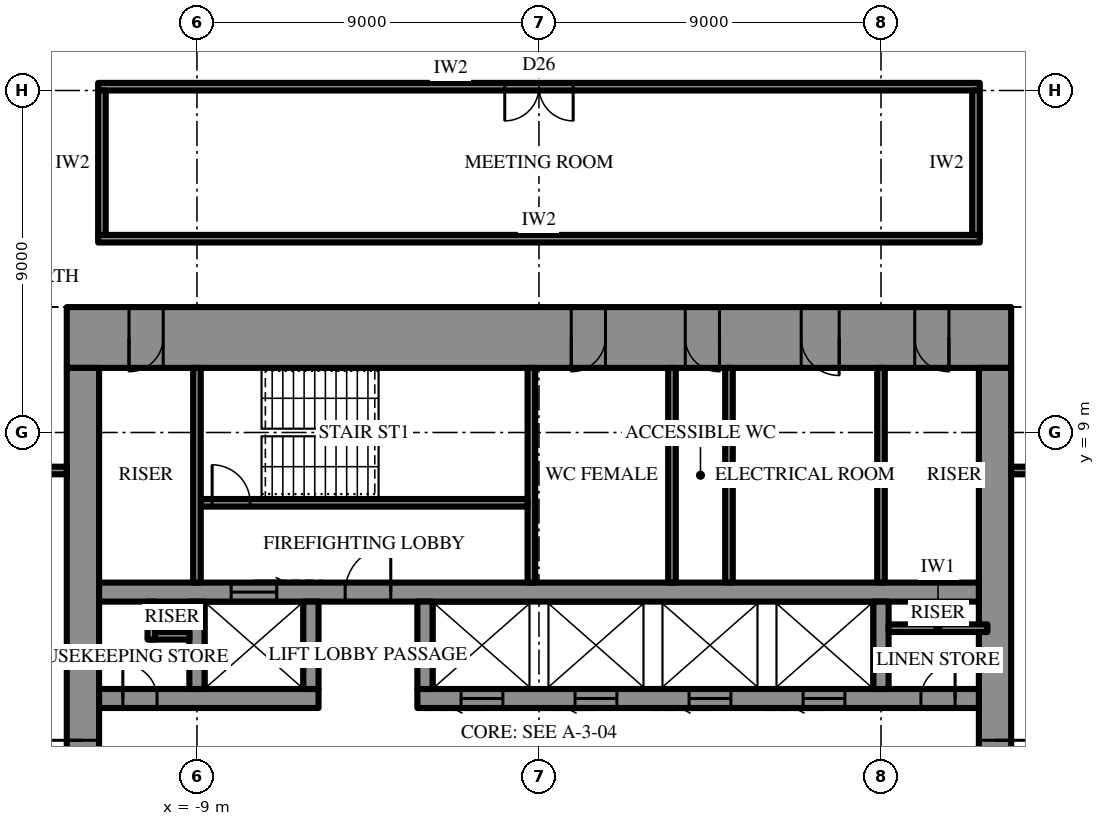
"""IFC4 building model, lengths in metres.
Left out: names, types, materials, properties, quantities, classifications, styles, units other than length and angle.
Written with IfcOpenShell. Run it as: python <this file> out.ifc"""

import sys

from ifc_helpers import new_model, si_unit, direction, frame, frame_2d, origin, place, context, subcontext, project, spatial, rectangle, extrude, element, fill, save


model = new_model("IFC4")
c1 = context("Model", 3, precision=1e-05, world=origin(), true_north=direction((0.0, 1.0)))
c2 = subcontext(c1, "Body", "Model", "MODEL_VIEW")
j1 = project(units=[si_unit("LENGTHUNIT", "METRE"), si_unit("PLANEANGLEUNIT", "RADIAN")], contexts=[c1])
p1 = place(None, origin())
s1 = spatial("IfcSite", under=j1, at=p1, CompositionType="ELEMENT")
p2 = place(p1, origin())
s2 = spatial("IfcBuilding", under=s1, at=p2, CompositionType="ELEMENT")
p3 = place(p2, frame((0.0, 0.0, 311.5)))
s3 = spatial("IfcBuildingStorey", under=s2, at=p3, CompositionType="ELEMENT", Elevation=311.5)
p4 = place(p3, frame((-12.425, 11.5, 0.0), z_axis=(0.0, 0.0, 1.0), x_axis=(1.0, 0.0, 0.0)))
e1 = element("IfcWall", 1, at=p4, inside=s3, PredefinedType="SHEAR", context=c2, shape_type="SweptSolid", body=[
    extrude(rectangle(XDim=24.85, YDim=1.6, at=frame_2d((12.425, 0.0))), origin(), (0.0, 0.0, 1.0), 4.2),
])
p5 = place(p4, frame((13.275, 0.0, 0.0)))
e2 = element("IfcOpeningElement", 2, at=p5, cuts=e1, PredefinedType="OPENING", context=c2, shape_type="SweptSolid", body=[
    extrude(rectangle(XDim=0.9, YDim=2.2, at=frame_2d((0.45, 1.1))), frame((0.0, 0.81, 0.0), z_axis=(0.0, -1.0, 0.0), x_axis=(1.0, 0.0, 0.0)), (0.0, 0.0, 1.0), 1.62),
])
p6 = place(p4, frame((16.275, 0.0, 0.0)))
e3 = element("IfcOpeningElement", 3, at=p6, cuts=e1, PredefinedType="OPENING", context=c2, shape_type="SweptSolid", body=[
    extrude(rectangle(XDim=0.9, YDim=2.2, at=frame_2d((0.45, 1.1))), frame((0.0, 0.81, 0.0), z_axis=(0.0, -1.0, 0.0), x_axis=(1.0, 0.0, 0.0)), (0.0, 0.0, 1.0), 1.62),
])
p7 = place(p4, frame((19.325, 0.0, 0.0)))
e4 = element("IfcOpeningElement", 4, at=p7, cuts=e1, PredefinedType="OPENING", context=c2, shape_type="SweptSolid", body=[
    extrude(rectangle(XDim=1.0, YDim=2.2, at=frame_2d((0.5, 1.1))), frame((0.0, 0.81, 0.0), z_axis=(0.0, -1.0, 0.0), x_axis=(1.0, 0.0, 0.0)), (0.0, 0.0, 1.0), 1.62),
])
p8 = place(p4, frame((1.637, 0.0, 0.0)))
e5 = element("IfcOpeningElement", 5, at=p8, cuts=e1, PredefinedType="OPENING", context=c2, shape_type="SweptSolid", body=[
    extrude(rectangle(XDim=0.9, YDim=2.2, at=frame_2d((0.45, 1.1))), frame((0.0, 0.81, 0.0), z_axis=(0.0, -1.0, 0.0), x_axis=(1.0, 0.0, 0.0)), (0.0, 0.0, 1.0), 1.62),
])
p9 = place(p4, frame((22.312, 0.0, 0.0)))
e6 = element("IfcOpeningElement", 6, at=p9, cuts=e1, PredefinedType="OPENING", context=c2, shape_type="SweptSolid", body=[
    extrude(rectangle(XDim=0.9, YDim=2.2, at=frame_2d((0.45, 1.1))), frame((0.0, 0.81, 0.0), z_axis=(0.0, -1.0, 0.0), x_axis=(1.0, 0.0, 0.0)), (0.0, 0.0, 1.0), 1.62),
])
p10 = place(p3, frame((12.0, -10.7, 0.0), z_axis=(0.0, 0.0, 1.0), x_axis=(0.0, 1.0, 0.0)))
e7 = element("IfcWall", 7, at=p10, inside=s3, PredefinedType="SHEAR", context=c2, shape_type="SweptSolid", body=[
    extrude(rectangle(XDim=21.4, YDim=0.85, at=frame_2d((10.7, 0.0))), origin(), (0.0, 0.0, 1.0), 4.2),
])
p11 = place(p10, frame((9.8, 0.0, 0.0)))
e8 = element("IfcOpeningElement", 8, at=p11, cuts=e7, PredefinedType="OPENING", context=c2, shape_type="SweptSolid", body=[
    extrude(rectangle(XDim=1.8, YDim=2.4, at=frame_2d((0.9, 1.2))), frame((0.0, 0.435, 0.0), z_axis=(0.0, -1.0, 0.0), x_axis=(1.0, 0.0, 0.0)), (0.0, 0.0, 1.0), 0.87),
])
p12 = place(p3, frame((-12.0, 10.7, 0.0), z_axis=(0.0, 0.0, 1.0), x_axis=(0.0, -1.0, 0.0)))
e9 = element("IfcWall", 9, at=p12, inside=s3, PredefinedType="SHEAR", context=c2, shape_type="SweptSolid", body=[
    extrude(rectangle(XDim=21.4, YDim=0.85, at=frame_2d((10.7, 0.0))), origin(), (0.0, 0.0, 1.0), 4.2),
])
p13 = place(p12, frame((9.8, 0.0, 0.0)))
e10 = element("IfcOpeningElement", 10, at=p13, cuts=e9, PredefinedType="OPENING", context=c2, shape_type="SweptSolid", body=[
    extrude(rectangle(XDim=1.8, YDim=2.4, at=frame_2d((0.9, 1.2))), frame((0.0, 0.435, 0.0), z_axis=(0.0, -1.0, 0.0), x_axis=(1.0, 0.0, 0.0)), (0.0, 0.0, 1.0), 0.87),
])
p14 = place(p3, frame((-11.575, 2.0, 0.0), z_axis=(0.0, 0.0, 1.0), x_axis=(1.0, 0.0, 0.0)))
e11 = element("IfcWall", 11, at=p14, inside=s3, PredefinedType="SHEAR", context=c2, shape_type="SweptSolid", body=[
    extrude(rectangle(XDim=5.775, YDim=0.5, at=frame_2d((2.887, 0.0))), origin(), (0.0, 0.0, 1.0), 4.2),
])
p15 = place(p14, frame((0.625, 0.0, 0.0)))
e12 = element("IfcOpeningElement", 12, at=p15, cuts=e11, PredefinedType="OPENING", context=c2, shape_type="SweptSolid", body=[
    extrude(rectangle(XDim=0.9, YDim=2.2, at=frame_2d((0.45, 1.1))), frame((0.0, 0.26, 0.0), z_axis=(0.0, -1.0, 0.0), x_axis=(1.0, 0.0, 0.0)), (0.0, 0.0, 1.0), 0.52),
])
p16 = place(p3, frame((-3.2, 2.0, 0.0), z_axis=(0.0, 0.0, 1.0), x_axis=(1.0, 0.0, 0.0)))
e13 = element("IfcWall", 13, at=p16, inside=s3, PredefinedType="SHEAR", context=c2, shape_type="SweptSolid", body=[
    extrude(rectangle(XDim=14.775, YDim=0.5, at=frame_2d((7.387, 0.0))), origin(), (0.0, 0.0, 1.0), 4.2),
])
p17 = place(p16, frame((13.25, 0.0, 0.0)))
e14 = element("IfcOpeningElement", 14, at=p17, cuts=e13, PredefinedType="OPENING", context=c2, shape_type="SweptSolid", body=[
    extrude(rectangle(XDim=0.9, YDim=2.2, at=frame_2d((0.45, 1.1))), frame((0.0, 0.26, 0.0), z_axis=(0.0, -1.0, 0.0), x_axis=(1.0, 0.0, 0.0)), (0.0, 0.0, 1.0), 0.52),
])
p18 = place(p16, frame((1.15, 0.0, 0.0)))
e15 = element("IfcOpeningElement", 15, at=p18, cuts=e13, PredefinedType="OPENING", context=c2, shape_type="SweptSolid", body=[
    extrude(rectangle(XDim=1.1, YDim=2.2, at=frame_2d((0.55, 1.1))), frame((0.0, 0.26, 0.0), z_axis=(0.0, -1.0, 0.0), x_axis=(1.0, 0.0, 0.0)), (0.0, 0.0, 1.0), 0.52),
])
p19 = place(p16, frame((4.15, 0.0, 0.0)))
e16 = element("IfcOpeningElement", 16, at=p19, cuts=e13, PredefinedType="OPENING", context=c2, shape_type="SweptSolid", body=[
    extrude(rectangle(XDim=1.1, YDim=2.2, at=frame_2d((0.55, 1.1))), frame((0.0, 0.26, 0.0), z_axis=(0.0, -1.0, 0.0), x_axis=(1.0, 0.0, 0.0)), (0.0, 0.0, 1.0), 0.52),
])
p20 = place(p16, frame((7.15, 0.0, 0.0)))
e17 = element("IfcOpeningElement", 17, at=p20, cuts=e13, PredefinedType="OPENING", context=c2, shape_type="SweptSolid", body=[
    extrude(rectangle(XDim=1.1, YDim=2.2, at=frame_2d((0.55, 1.1))), frame((0.0, 0.26, 0.0), z_axis=(0.0, -1.0, 0.0), x_axis=(1.0, 0.0, 0.0)), (0.0, 0.0, 1.0), 0.52),
])
p21 = place(p16, frame((10.15, 0.0, 0.0)))
e18 = element("IfcOpeningElement", 18, at=p21, cuts=e13, PredefinedType="OPENING", context=c2, shape_type="SweptSolid", body=[
    extrude(rectangle(XDim=1.1, YDim=2.2, at=frame_2d((0.55, 1.1))), frame((0.0, 0.26, 0.0), z_axis=(0.0, -1.0, 0.0), x_axis=(1.0, 0.0, 0.0)), (0.0, 0.0, 1.0), 0.52),
])
p22 = place(p3, frame((-11.575, 4.8, 0.0), z_axis=(0.0, 0.0, 1.0), x_axis=(1.0, 0.0, 0.0)))
e19 = element("IfcWall", 19, at=p22, inside=s3, PredefinedType="SHEAR", context=c2, shape_type="SweptSolid", body=[
    extrude(rectangle(XDim=23.15, YDim=0.5, at=frame_2d((11.575, 0.0))), origin(), (0.0, 0.0, 1.0), 4.2),
])
p23 = place(p22, frame((6.475, 0.0, 0.0)))
e20 = element("IfcOpeningElement", 20, at=p23, cuts=e19, PredefinedType="OPENING", context=c2, shape_type="SweptSolid", body=[
    extrude(rectangle(XDim=1.2, YDim=2.2, at=frame_2d((0.6, 1.1))), frame((0.0, 0.26, 0.0), z_axis=(0.0, -1.0, 0.0), x_axis=(1.0, 0.0, 0.0)), (0.0, 0.0, 1.0), 0.52),
])
p24 = place(p22, frame((3.475, 0.0, 0.0)))
e21 = element("IfcOpeningElement", 21, at=p24, cuts=e19, PredefinedType="OPENING", context=c2, shape_type="SweptSolid", body=[
    extrude(rectangle(XDim=1.2, YDim=2.2, at=frame_2d((0.6, 1.1))), frame((0.0, 0.26, 0.0), z_axis=(0.0, -1.0, 0.0), x_axis=(1.0, 0.0, 0.0)), (0.0, 0.0, 1.0), 0.52),
])
for number, where, z_axis, x_axis in (
    (22, (-9.0, 2.25, 0.0), (0.0, 0.0, 1.0), (0.0, 1.0, 0.0)),
    (23, (-6.0, 2.25, 0.0), (0.0, 0.0, 1.0), (0.0, 1.0, 0.0)),
    (24, (-3.0, 2.25, 0.0), (0.0, 0.0, 1.0), (0.0, 1.0, 0.0)),
    (25, (9.0, 2.25, 0.0), (0.0, 0.0, 1.0), (0.0, 1.0, 0.0)),
):
    element("IfcWall", number, at=place(p3, frame(where, z_axis=z_axis, x_axis=x_axis)), inside=s3, PredefinedType="SHEAR", context=c2, shape_type="SweptSolid", body=[
        extrude(rectangle(XDim=2.3, YDim=0.4, at=frame_2d((1.15, 0.0))), origin(), (0.0, 0.0, 1.0), 4.2),
    ])
p25 = place(p3, frame((-0.2, 5.05, 0.0), z_axis=(0.0, 0.0, 1.0), x_axis=(0.0, 1.0, 0.0)))
e26 = element("IfcWall", 26, at=p25, inside=s3, PredefinedType="SHEAR", context=c2, shape_type="SweptSolid", body=[
    extrude(rectangle(XDim=5.65, YDim=0.2, at=frame_2d((2.825, 0.0))), origin(), (0.0, 0.0, 1.0), 4.2),
])
p26 = place(p3, frame((-8.9, 7.15, 0.0), z_axis=(0.0, 0.0, 1.0), x_axis=(1.0, 0.0, 0.0)))
e27 = element("IfcWall", 27, at=p26, inside=s3, PredefinedType="SHEAR", context=c2, shape_type="SweptSolid", body=[
    extrude(rectangle(XDim=8.6, YDim=0.2, at=frame_2d((4.3, 0.0))), origin(), (0.0, 0.0, 1.0), 4.2),
])
p27 = place(p26, frame((0.3, 0.0, 0.0)))
e28 = element("IfcOpeningElement", 28, at=p27, cuts=e27, PredefinedType="OPENING", context=c2, shape_type="SweptSolid", body=[
    extrude(rectangle(XDim=1.0, YDim=2.2, at=frame_2d((0.5, 1.1))), frame((0.0, 0.11, 0.0), z_axis=(0.0, -1.0, 0.0), x_axis=(1.0, 0.0, 0.0)), (0.0, 0.0, 1.0), 0.22),
])
for number, where, z_axis, x_axis in (
    (29, (-9.0, 5.05, 0.0), (0.0, 0.0, 1.0), (0.0, 1.0, 0.0)),
    (30, (9.0, 5.05, 0.0), (0.0, 0.0, 1.0), (0.0, 1.0, 0.0)),
    (31, (3.5, 5.05, 0.0), (0.0, 0.0, 1.0), (0.0, 1.0, 0.0)),
    (32, (5.0, 5.05, 0.0), (0.0, 0.0, 1.0), (0.0, 1.0, 0.0)),
):
    element("IfcWall", number, at=place(p3, frame(where, z_axis=z_axis, x_axis=x_axis)), inside=s3, PredefinedType="PARTITIONING", context=c2, shape_type="SweptSolid", body=[
        extrude(rectangle(XDim=5.65, YDim=0.2, at=frame_2d((2.825, 0.0))), origin(), (0.0, 0.0, 1.0), 4.0),
    ])
for number, where, z_axis, x_axis in (
    (33, (-10.2, 3.65, 0.0), (0.0, 0.0, 1.0), (1.0, 0.0, 0.0)),
    (34, (-10.2, 3.55, 0.0), (0.0, 0.0, 1.0), (0.0, 1.0, 0.0)),
):
    element("IfcWall", number, at=place(p3, frame(where, z_axis=z_axis, x_axis=x_axis)), inside=s3, PredefinedType="PARTITIONING", context=c2, shape_type="SweptSolid", body=[
        extrude(rectangle(XDim=1.0, YDim=0.2, at=frame_2d((0.5, 0.0))), origin(), (0.0, 0.0, 1.0), 4.0),
    ])
p28 = place(p3, frame((9.2, 3.85, 0.0), z_axis=(0.0, 0.0, 1.0), x_axis=(1.0, 0.0, 0.0)))
e35 = element("IfcWall", 35, at=p28, inside=s3, PredefinedType="PARTITIONING", context=c2, shape_type="SweptSolid", body=[
    extrude(rectangle(XDim=2.6, YDim=0.2, at=frame_2d((1.3, 0.0))), origin(), (0.0, 0.0, 1.0), 4.0),
])
p29 = place(p3, frame((-11.6, 14.1, 0.0), z_axis=(0.0, 0.0, 1.0), x_axis=(1.0, 0.0, 0.0)))
e36 = element("IfcWall", 36, at=p29, inside=s3, PredefinedType="PARTITIONING", context=c2, shape_type="SweptSolid", body=[
    extrude(rectangle(XDim=23.2, YDim=0.2, at=frame_2d((11.6, 0.0))), origin(), (0.0, 0.0, 1.0), 4.0),
])
p30 = place(p3, frame((-11.6, 18.1, 0.0), z_axis=(0.0, 0.0, 1.0), x_axis=(1.0, 0.0, 0.0)))
e37 = element("IfcWall", 37, at=p30, inside=s3, PredefinedType="PARTITIONING", context=c2, shape_type="SweptSolid", body=[
    extrude(rectangle(XDim=23.2, YDim=0.2, at=frame_2d((11.6, 0.0))), origin(), (0.0, 0.0, 1.0), 4.0),
])
p31 = place(p30, frame((10.7, 0.0, 0.0)))
e38 = element("IfcOpeningElement", 38, at=p31, cuts=e37, PredefinedType="OPENING", context=c2, shape_type="SweptSolid", body=[
    extrude(rectangle(XDim=1.8, YDim=2.4, at=frame_2d((0.9, 1.2))), frame((0.0, 0.11, 0.0), z_axis=(0.0, -1.0, 0.0), x_axis=(1.0, 0.0, 0.0)), (0.0, 0.0, 1.0), 0.22),
])
for number, where, z_axis, x_axis in (
    (39, (-11.5, 14.2, 0.0), (0.0, 0.0, 1.0), (0.0, 1.0, 0.0)),
    (40, (11.5, 14.2, 0.0), (0.0, 0.0, 1.0), (0.0, 1.0, 0.0)),
):
    element("IfcWall", number, at=place(p3, frame(where, z_axis=z_axis, x_axis=x_axis)), inside=s3, PredefinedType="PARTITIONING", context=c2, shape_type="SweptSolid", body=[
        extrude(rectangle(XDim=3.8, YDim=0.2, at=frame_2d((1.9, 0.0))), origin(), (0.0, 0.0, 1.0), 4.0),
    ])
p32 = place(p3, frame((12.425, 8.0, 0.0), z_axis=(0.0, 0.0, 1.0), x_axis=(1.0, 0.0, 0.0)))
e41 = element("IfcWall", 41, at=p32, inside=s3, PredefinedType="PARTITIONING", context=c2, shape_type="SweptSolid", body=[
    extrude(rectangle(XDim=13.59, YDim=0.2, at=frame_2d((6.795, 0.0))), origin(), (0.0, 0.0, 1.0), 4.0),
])
p33 = place(p32, frame((0.859, 0.0, 0.0)))
e42 = element("IfcOpeningElement", 42, at=p33, cuts=e41, PredefinedType="OPENING", context=c2, shape_type="SweptSolid", body=[
    extrude(rectangle(XDim=1.0, YDim=2.2, at=frame_2d((0.5, 1.1))), frame((0.0, 0.11, 0.0), z_axis=(0.0, -1.0, 0.0), x_axis=(1.0, 0.0, 0.0)), (0.0, 0.0, 1.0), 0.22),
])
p34 = place(p3, frame((-12.425, 8.0, 0.0), z_axis=(0.0, 0.0, 1.0), x_axis=(-1.0, 0.0, 0.0)))
e43 = element("IfcWall", 43, at=p34, inside=s3, PredefinedType="PARTITIONING", context=c2, shape_type="SweptSolid", body=[
    extrude(rectangle(XDim=13.59, YDim=0.2, at=frame_2d((6.795, 0.0))), origin(), (0.0, 0.0, 1.0), 4.0),
])
p35 = place(p34, frame((0.859, 0.0, 0.0)))
e44 = element("IfcOpeningElement", 44, at=p35, cuts=e43, PredefinedType="OPENING", context=c2, shape_type="SweptSolid", body=[
    extrude(rectangle(XDim=1.0, YDim=2.2, at=frame_2d((0.5, 1.1))), frame((0.0, 0.11, 0.0), z_axis=(0.0, -1.0, 0.0), x_axis=(1.0, 0.0, 0.0)), (0.0, 0.0, 1.0), 0.22),
])
p36 = place(p11, frame((1.8, 0.0, 0.0), z_axis=(0.0, 0.0, 1.0), x_axis=(-1.0, 0.0, 0.0)))
e45 = element("IfcDoor", 45, at=p36, inside=s3, OperationType="DOUBLE_DOOR_SINGLE_SWING", PredefinedType="DOOR", context=c2, shape_type="SweptSolid", body=[
    extrude(rectangle(XDim=1.8, YDim=2.4, at=frame_2d((0.9, 1.2))), frame((0.0, 0.025, 0.0), z_axis=(0.0, -1.0, 0.0), x_axis=(1.0, 0.0, 0.0)), (0.0, 0.0, 1.0), 0.05),
])
fill(e8, e45)
p37 = place(p13, frame((1.8, 0.0, 0.0), z_axis=(0.0, 0.0, 1.0), x_axis=(-1.0, 0.0, 0.0)))
e46 = element("IfcDoor", 46, at=p37, inside=s3, OperationType="DOUBLE_DOOR_SINGLE_SWING", PredefinedType="DOOR", context=c2, shape_type="SweptSolid", body=[
    extrude(rectangle(XDim=1.8, YDim=2.4, at=frame_2d((0.9, 1.2))), frame((0.0, 0.025, 0.0), z_axis=(0.0, -1.0, 0.0), x_axis=(1.0, 0.0, 0.0)), (0.0, 0.0, 1.0), 0.05),
])
fill(e10, e46)
p38 = place(p23, origin())
e47 = element("IfcDoor", 47, at=p38, inside=s3, OperationType="SINGLE_SWING_LEFT", PredefinedType="DOOR", context=c2, shape_type="SweptSolid", body=[
    extrude(rectangle(XDim=1.2, YDim=2.2, at=frame_2d((0.6, 1.1))), frame((0.0, 0.025, 0.0), z_axis=(0.0, -1.0, 0.0), x_axis=(1.0, 0.0, 0.0)), (0.0, 0.0, 1.0), 0.05),
])
fill(e20, e47)
p39 = place(p27, origin())
e48 = element("IfcDoor", 48, at=p39, inside=s3, OperationType="SINGLE_SWING_RIGHT", PredefinedType="DOOR", context=c2, shape_type="SweptSolid", body=[
    extrude(rectangle(XDim=1.0, YDim=2.2, at=frame_2d((0.5, 1.1))), frame((0.0, 0.025, 0.0), z_axis=(0.0, -1.0, 0.0), x_axis=(1.0, 0.0, 0.0)), (0.0, 0.0, 1.0), 0.05),
])
fill(e28, e48)
p40 = place(p5, frame((0.9, 0.0, 0.0), z_axis=(0.0, 0.0, 1.0), x_axis=(-1.0, 0.0, 0.0)))
e49 = element("IfcDoor", 49, at=p40, inside=s3, OperationType="SINGLE_SWING_LEFT", PredefinedType="DOOR", context=c2, shape_type="SweptSolid", body=[
    extrude(rectangle(XDim=0.9, YDim=2.2, at=frame_2d((0.45, 1.1))), frame((0.0, 0.025, 0.0), z_axis=(0.0, -1.0, 0.0), x_axis=(1.0, 0.0, 0.0)), (0.0, 0.0, 1.0), 0.05),
])
fill(e2, e49)
p41 = place(p6, frame((0.9, 0.0, 0.0), z_axis=(0.0, 0.0, 1.0), x_axis=(-1.0, 0.0, 0.0)))
e50 = element("IfcDoor", 50, at=p41, inside=s3, OperationType="SINGLE_SWING_RIGHT", PredefinedType="DOOR", context=c2, shape_type="SweptSolid", body=[
    extrude(rectangle(XDim=0.9, YDim=2.2, at=frame_2d((0.45, 1.1))), frame((0.0, 0.025, 0.0), z_axis=(0.0, -1.0, 0.0), x_axis=(1.0, 0.0, 0.0)), (0.0, 0.0, 1.0), 0.05),
])
fill(e3, e50)
p42 = place(p7, frame((1.0, 0.0, 0.0), z_axis=(0.0, 0.0, 1.0), x_axis=(-1.0, 0.0, 0.0)))
e51 = element("IfcDoor", 51, at=p42, inside=s3, OperationType="SINGLE_SWING_RIGHT", PredefinedType="DOOR", context=c2, shape_type="SweptSolid", body=[
    extrude(rectangle(XDim=1.0, YDim=2.2, at=frame_2d((0.5, 1.1))), frame((0.0, 0.025, 0.0), z_axis=(0.0, -1.0, 0.0), x_axis=(1.0, 0.0, 0.0)), (0.0, 0.0, 1.0), 0.05),
])
fill(e4, e51)
p43 = place(p8, frame((0.9, 0.0, 0.0), z_axis=(0.0, 0.0, 1.0), x_axis=(-1.0, 0.0, 0.0)))
e52 = element("IfcDoor", 52, at=p43, inside=s3, OperationType="SINGLE_SWING_LEFT", PredefinedType="DOOR", context=c2, shape_type="SweptSolid", body=[
    extrude(rectangle(XDim=0.9, YDim=2.2, at=frame_2d((0.45, 1.1))), frame((0.0, 0.025, 0.0), z_axis=(0.0, -1.0, 0.0), x_axis=(1.0, 0.0, 0.0)), (0.0, 0.0, 1.0), 0.05),
])
fill(e5, e52)
p44 = place(p9, frame((0.9, 0.0, 0.0), z_axis=(0.0, 0.0, 1.0), x_axis=(-1.0, 0.0, 0.0)))
e53 = element("IfcDoor", 53, at=p44, inside=s3, OperationType="SINGLE_SWING_RIGHT", PredefinedType="DOOR", context=c2, shape_type="SweptSolid", body=[
    extrude(rectangle(XDim=0.9, YDim=2.2, at=frame_2d((0.45, 1.1))), frame((0.0, 0.025, 0.0), z_axis=(0.0, -1.0, 0.0), x_axis=(1.0, 0.0, 0.0)), (0.0, 0.0, 1.0), 0.05),
])
fill(e6, e53)
p45 = place(p15, origin())
e54 = element("IfcDoor", 54, at=p45, inside=s3, OperationType="SINGLE_SWING_RIGHT", PredefinedType="DOOR", context=c2, shape_type="SweptSolid", body=[
    extrude(rectangle(XDim=0.9, YDim=2.2, at=frame_2d((0.45, 1.1))), frame((0.0, 0.025, 0.0), z_axis=(0.0, -1.0, 0.0), x_axis=(1.0, 0.0, 0.0)), (0.0, 0.0, 1.0), 0.05),
])
fill(e12, e54)
p46 = place(p17, origin())
e55 = element("IfcDoor", 55, at=p46, inside=s3, OperationType="SINGLE_SWING_LEFT", PredefinedType="DOOR", context=c2, shape_type="SweptSolid", body=[
    extrude(rectangle(XDim=0.9, YDim=2.2, at=frame_2d((0.45, 1.1))), frame((0.0, 0.025, 0.0), z_axis=(0.0, -1.0, 0.0), x_axis=(1.0, 0.0, 0.0)), (0.0, 0.0, 1.0), 0.05),
])
fill(e14, e55)
p47 = place(p24, origin())
e56 = element("IfcDoor", 56, at=p47, inside=s3, OperationType="SLIDING_TO_LEFT", PredefinedType="DOOR", context=c2, shape_type="SweptSolid", body=[
    extrude(rectangle(XDim=1.2, YDim=2.2, at=frame_2d((0.6, 1.1))), frame((0.0, 0.025, 0.0), z_axis=(0.0, -1.0, 0.0), x_axis=(1.0, 0.0, 0.0)), (0.0, 0.0, 1.0), 0.05),
])
fill(e21, e56)
p48 = place(p18, frame((1.1, 0.0, 0.0), z_axis=(0.0, 0.0, 1.0), x_axis=(-1.0, 0.0, 0.0)))
e57 = element("IfcDoor", 57, at=p48, inside=s3, OperationType="SLIDING_TO_LEFT", PredefinedType="DOOR", context=c2, shape_type="SweptSolid", body=[
    extrude(rectangle(XDim=1.1, YDim=2.2, at=frame_2d((0.55, 1.1))), frame((0.0, 0.025, 0.0), z_axis=(0.0, -1.0, 0.0), x_axis=(1.0, 0.0, 0.0)), (0.0, 0.0, 1.0), 0.05),
])
fill(e15, e57)
p49 = place(p19, frame((1.1, 0.0, 0.0), z_axis=(0.0, 0.0, 1.0), x_axis=(-1.0, 0.0, 0.0)))
e58 = element("IfcDoor", 58, at=p49, inside=s3, OperationType="SLIDING_TO_LEFT", PredefinedType="DOOR", context=c2, shape_type="SweptSolid", body=[
    extrude(rectangle(XDim=1.1, YDim=2.2, at=frame_2d((0.55, 1.1))), frame((0.0, 0.025, 0.0), z_axis=(0.0, -1.0, 0.0), x_axis=(1.0, 0.0, 0.0)), (0.0, 0.0, 1.0), 0.05),
])
fill(e16, e58)
p50 = place(p20, frame((1.1, 0.0, 0.0), z_axis=(0.0, 0.0, 1.0), x_axis=(-1.0, 0.0, 0.0)))
e59 = element("IfcDoor", 59, at=p50, inside=s3, OperationType="SLIDING_TO_LEFT", PredefinedType="DOOR", context=c2, shape_type="SweptSolid", body=[
    extrude(rectangle(XDim=1.1, YDim=2.2, at=frame_2d((0.55, 1.1))), frame((0.0, 0.025, 0.0), z_axis=(0.0, -1.0, 0.0), x_axis=(1.0, 0.0, 0.0)), (0.0, 0.0, 1.0), 0.05),
])
fill(e17, e59)
p51 = place(p21, frame((1.1, 0.0, 0.0), z_axis=(0.0, 0.0, 1.0), x_axis=(-1.0, 0.0, 0.0)))
e60 = element("IfcDoor", 60, at=p51, inside=s3, OperationType="SLIDING_TO_LEFT", PredefinedType="DOOR", context=c2, shape_type="SweptSolid", body=[
    extrude(rectangle(XDim=1.1, YDim=2.2, at=frame_2d((0.55, 1.1))), frame((0.0, 0.025, 0.0), z_axis=(0.0, -1.0, 0.0), x_axis=(1.0, 0.0, 0.0)), (0.0, 0.0, 1.0), 0.05),
])
fill(e18, e60)
p52 = place(p31, frame((1.8, 0.0, 0.0), z_axis=(0.0, 0.0, 1.0), x_axis=(-1.0, 0.0, 0.0)))
e61 = element("IfcDoor", 61, at=p52, inside=s3, OperationType="DOUBLE_DOOR_SINGLE_SWING", PredefinedType="DOOR", context=c2, shape_type="SweptSolid", body=[
    extrude(rectangle(XDim=1.8, YDim=2.4, at=frame_2d((0.9, 1.2))), frame((0.0, 0.025, 0.0), z_axis=(0.0, -1.0, 0.0), x_axis=(1.0, 0.0, 0.0)), (0.0, 0.0, 1.0), 0.05),
])
fill(e38, e61)
save(model, sys.argv[1])
